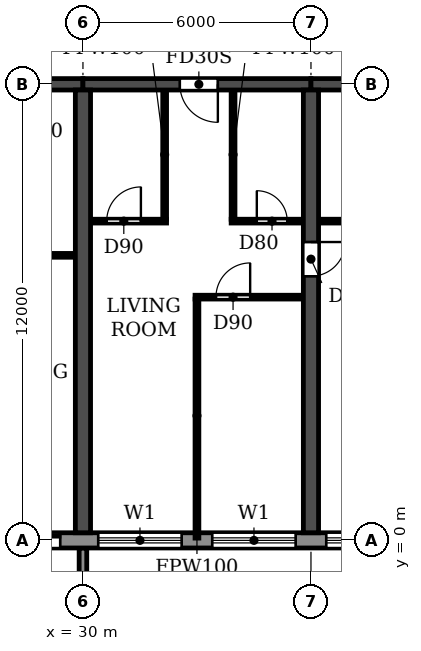
"""IFC4 building model, lengths in metres.
Left out: names, types, materials, properties, quantities, classifications, styles, units other than length and angle.
Written with IfcOpenShell. Run it as: python <this file> out.ifc"""

import sys

from ifc_helpers import new_model, si_unit, direction, frame, frame_2d, origin, place, context, subcontext, project, spatial, polyline, rectangle, outline, extrude, source, transform, mapped, element, fill, save


model = new_model("IFC4")
c1 = context("Model", 3, precision=1e-05, world=origin(), true_north=direction((0.0, 1.0)))
c2 = subcontext(c1, "Body", "Model", "MODEL_VIEW")
j1 = project(units=[si_unit("LENGTHUNIT", "METRE"), si_unit("PLANEANGLEUNIT", "RADIAN")], contexts=[c1])
p1 = place(None, origin())
s1 = spatial("IfcSite", under=j1, at=p1, CompositionType="ELEMENT")
p2 = place(p1, origin())
s2 = spatial("IfcBuilding", under=s1, at=p2, CompositionType="ELEMENT")
p3 = place(p2, frame((0.0, 0.0, 33.3)))
s3 = spatial("IfcBuildingStorey", under=s2, at=p3, CompositionType="ELEMENT", Elevation=33.3)
p4 = place(p3, frame((30.0, 0.2, 0.0), z_axis=(0.0, 0.0, 1.0), x_axis=(0.0, 1.0, 0.0)))
e1 = element("IfcWall", 1, at=p4, inside=s3, PredefinedType="SHEAR", context=c2, shape_type="SweptSolid", body=[
    extrude(rectangle(XDim=11.65, YDim=0.4, at=frame_2d((5.825, 0.0))), origin(), (0.0, 0.0, 1.0), 3.05),
])
p5 = place(p3, frame((36.0, 0.2, 0.0), z_axis=(0.0, 0.0, 1.0), x_axis=(0.0, 1.0, 0.0)))
e2 = element("IfcWall", 2, at=p5, inside=s3, PredefinedType="SHEAR", context=c2, shape_type="SweptSolid", body=[
    extrude(rectangle(XDim=11.65, YDim=0.4, at=frame_2d((5.825, 0.0))), origin(), (0.0, 0.0, 1.0), 3.05),
])
p6 = place(p5, frame((6.75, 0.0, 0.0)))
e3 = element("IfcOpeningElement", 3, at=p6, cuts=e2, PredefinedType="OPENING", context=c2, shape_type="SweptSolid", body=[
    extrude(rectangle(XDim=0.9, YDim=2.1, at=frame_2d((0.45, 1.05))), frame((0.0, 0.21, 0.0), z_axis=(0.0, -1.0, 0.0), x_axis=(1.0, 0.0, 0.0)), (0.0, 0.0, 1.0), 0.42),
])
p7 = place(p3, frame((24.0, 12.0, 0.0), z_axis=(0.0, 0.0, 1.0), x_axis=(1.0, 0.0, 0.0)))
e4 = element("IfcWall", 4, at=p7, inside=s3, PredefinedType="SHEAR", context=c2, shape_type="SweptSolid", body=[
    extrude(rectangle(XDim=6.0, YDim=0.3, at=frame_2d((3.0, 0.0))), origin(), (0.0, 0.0, 1.0), 2.45),
])
p8 = place(p7, frame((2.55, 0.0, 0.0)))
e5 = element("IfcOpeningElement", 5, at=p8, cuts=e4, PredefinedType="OPENING", context=c2, shape_type="SweptSolid", body=[
    extrude(rectangle(XDim=1.0, YDim=2.1, at=frame_2d((0.5, 1.05))), frame((0.0, 0.16, 0.0), z_axis=(0.0, -1.0, 0.0), x_axis=(1.0, 0.0, 0.0)), (0.0, 0.0, 1.0), 0.32),
])
p9 = place(p3, frame((30.0, 12.0, 0.0), z_axis=(0.0, 0.0, 1.0), x_axis=(1.0, 0.0, 0.0)))
e6 = element("IfcWall", 6, at=p9, inside=s3, PredefinedType="SHEAR", context=c2, shape_type="SweptSolid", body=[
    extrude(rectangle(XDim=6.0, YDim=0.3, at=frame_2d((3.0, 0.0))), origin(), (0.0, 0.0, 1.0), 2.45),
])
p10 = place(p9, frame((2.55, 0.0, 0.0)))
e7 = element("IfcOpeningElement", 7, at=p10, cuts=e6, PredefinedType="OPENING", context=c2, shape_type="SweptSolid", body=[
    extrude(rectangle(XDim=1.0, YDim=2.1, at=frame_2d((0.5, 1.05))), frame((0.0, 0.16, 0.0), z_axis=(0.0, -1.0, 0.0), x_axis=(1.0, 0.0, 0.0)), (0.0, 0.0, 1.0), 0.32),
])
p11 = place(p3, frame((36.0, 12.0, 0.0), z_axis=(0.0, 0.0, 1.0), x_axis=(1.0, 0.0, 0.0)))
e8 = element("IfcWall", 8, at=p11, inside=s3, PredefinedType="SHEAR", context=c2, shape_type="SweptSolid", body=[
    extrude(rectangle(XDim=6.0, YDim=0.3, at=frame_2d((3.0, 0.0))), origin(), (0.0, 0.0, 1.0), 2.45),
])
p12 = place(p3, frame((4.683, 0.0, 0.0), z_axis=(0.0, 0.0, 1.0), x_axis=(1.0, 0.0, 0.0)))
e9 = element("IfcWall", 9, at=p12, inside=s3, PredefinedType="STANDARD", context=c2, shape_type="SweptSolid", body=[
    extrude(rectangle(XDim=92.634, YDim=0.4, at=frame_2d((46.317, 0.0))), origin(), (0.0, 0.0, 1.0), 3.05),
])
p13 = place(p12, frame((1.717, 0.0, 0.9)))
e10 = element("IfcOpeningElement", 10, at=p13, cuts=e9, PredefinedType="OPENING", context=c2, shape_type="SweptSolid", body=[
    extrude(rectangle(XDim=2.2, YDim=1.5, at=frame_2d((1.1, 0.75))), frame((0.0, 0.21, 0.0), z_axis=(0.0, -1.0, 0.0), x_axis=(1.0, 0.0, 0.0)), (0.0, 0.0, 1.0), 0.42),
])
p14 = place(p12, frame((4.717, 0.0, 0.9)))
e11 = element("IfcOpeningElement", 11, at=p14, cuts=e9, PredefinedType="OPENING", context=c2, shape_type="SweptSolid", body=[
    extrude(rectangle(XDim=2.2, YDim=1.5, at=frame_2d((1.1, 0.75))), frame((0.0, 0.21, 0.0), z_axis=(0.0, -1.0, 0.0), x_axis=(1.0, 0.0, 0.0)), (0.0, 0.0, 1.0), 0.42),
])
p15 = place(p12, frame((7.917, 0.0, 0.0)))
e12 = element("IfcOpeningElement", 12, at=p15, cuts=e9, PredefinedType="OPENING", context=c2, shape_type="SweptSolid", body=[
    extrude(rectangle(XDim=1.8, YDim=2.4, at=frame_2d((0.9, 1.2))), frame((0.0, 0.21, 0.0), z_axis=(0.0, -1.0, 0.0), x_axis=(1.0, 0.0, 0.0)), (0.0, 0.0, 1.0), 0.42),
])
p16 = place(p12, frame((10.717, 0.0, 0.9)))
e13 = element("IfcOpeningElement", 13, at=p16, cuts=e9, PredefinedType="OPENING", context=c2, shape_type="SweptSolid", body=[
    extrude(rectangle(XDim=2.2, YDim=1.5, at=frame_2d((1.1, 0.75))), frame((0.0, 0.21, 0.0), z_axis=(0.0, -1.0, 0.0), x_axis=(1.0, 0.0, 0.0)), (0.0, 0.0, 1.0), 0.42),
])
p17 = place(p12, frame((13.717, 0.0, 0.9)))
e14 = element("IfcOpeningElement", 14, at=p17, cuts=e9, PredefinedType="OPENING", context=c2, shape_type="SweptSolid", body=[
    extrude(rectangle(XDim=2.2, YDim=1.5, at=frame_2d((1.1, 0.75))), frame((0.0, 0.21, 0.0), z_axis=(0.0, -1.0, 0.0), x_axis=(1.0, 0.0, 0.0)), (0.0, 0.0, 1.0), 0.42),
])
p18 = place(p12, frame((16.717, 0.0, 0.9)))
e15 = element("IfcOpeningElement", 15, at=p18, cuts=e9, PredefinedType="OPENING", context=c2, shape_type="SweptSolid", body=[
    extrude(rectangle(XDim=2.2, YDim=1.5, at=frame_2d((1.1, 0.75))), frame((0.0, 0.21, 0.0), z_axis=(0.0, -1.0, 0.0), x_axis=(1.0, 0.0, 0.0)), (0.0, 0.0, 1.0), 0.42),
])
p19 = place(p12, frame((19.717, 0.0, 0.9)))
e16 = element("IfcOpeningElement", 16, at=p19, cuts=e9, PredefinedType="OPENING", context=c2, shape_type="SweptSolid", body=[
    extrude(rectangle(XDim=2.2, YDim=1.5, at=frame_2d((1.1, 0.75))), frame((0.0, 0.21, 0.0), z_axis=(0.0, -1.0, 0.0), x_axis=(1.0, 0.0, 0.0)), (0.0, 0.0, 1.0), 0.42),
])
p20 = place(p12, frame((22.917, 0.0, 0.0)))
e17 = element("IfcOpeningElement", 17, at=p20, cuts=e9, PredefinedType="OPENING", context=c2, shape_type="SweptSolid", body=[
    extrude(rectangle(XDim=1.8, YDim=2.4, at=frame_2d((0.9, 1.2))), frame((0.0, 0.21, 0.0), z_axis=(0.0, -1.0, 0.0), x_axis=(1.0, 0.0, 0.0)), (0.0, 0.0, 1.0), 0.42),
])
p21 = place(p12, frame((25.717, 0.0, 0.9)))
e18 = element("IfcOpeningElement", 18, at=p21, cuts=e9, PredefinedType="OPENING", context=c2, shape_type="SweptSolid", body=[
    extrude(rectangle(XDim=2.2, YDim=1.5, at=frame_2d((1.1, 0.75))), frame((0.0, 0.21, 0.0), z_axis=(0.0, -1.0, 0.0), x_axis=(1.0, 0.0, 0.0)), (0.0, 0.0, 1.0), 0.42),
])
p22 = place(p12, frame((28.717, 0.0, 0.9)))
e19 = element("IfcOpeningElement", 19, at=p22, cuts=e9, PredefinedType="OPENING", context=c2, shape_type="SweptSolid", body=[
    extrude(rectangle(XDim=2.2, YDim=1.5, at=frame_2d((1.1, 0.75))), frame((0.0, 0.21, 0.0), z_axis=(0.0, -1.0, 0.0), x_axis=(1.0, 0.0, 0.0)), (0.0, 0.0, 1.0), 0.42),
])
p23 = place(p12, frame((31.717, 0.0, 0.9)))
e20 = element("IfcOpeningElement", 20, at=p23, cuts=e9, PredefinedType="OPENING", context=c2, shape_type="SweptSolid", body=[
    extrude(rectangle(XDim=2.2, YDim=1.5, at=frame_2d((1.1, 0.75))), frame((0.0, 0.21, 0.0), z_axis=(0.0, -1.0, 0.0), x_axis=(1.0, 0.0, 0.0)), (0.0, 0.0, 1.0), 0.42),
])
p24 = place(p12, frame((34.717, 0.0, 0.9)))
e21 = element("IfcOpeningElement", 21, at=p24, cuts=e9, PredefinedType="OPENING", context=c2, shape_type="SweptSolid", body=[
    extrude(rectangle(XDim=2.2, YDim=1.5, at=frame_2d((1.1, 0.75))), frame((0.0, 0.21, 0.0), z_axis=(0.0, -1.0, 0.0), x_axis=(1.0, 0.0, 0.0)), (0.0, 0.0, 1.0), 0.42),
])
p25 = place(p12, frame((37.717, 0.0, 0.9)))
e22 = element("IfcOpeningElement", 22, at=p25, cuts=e9, PredefinedType="OPENING", context=c2, shape_type="SweptSolid", body=[
    extrude(rectangle(XDim=2.2, YDim=1.5, at=frame_2d((1.1, 0.75))), frame((0.0, 0.21, 0.0), z_axis=(0.0, -1.0, 0.0), x_axis=(1.0, 0.0, 0.0)), (0.0, 0.0, 1.0), 0.42),
])
p26 = place(p12, frame((40.717, 0.0, 0.9)))
e23 = element("IfcOpeningElement", 23, at=p26, cuts=e9, PredefinedType="OPENING", context=c2, shape_type="SweptSolid", body=[
    extrude(rectangle(XDim=2.2, YDim=1.5, at=frame_2d((1.1, 0.75))), frame((0.0, 0.21, 0.0), z_axis=(0.0, -1.0, 0.0), x_axis=(1.0, 0.0, 0.0)), (0.0, 0.0, 1.0), 0.42),
])
p27 = place(p12, frame((43.717, 0.0, 0.9)))
e24 = element("IfcOpeningElement", 24, at=p27, cuts=e9, PredefinedType="OPENING", context=c2, shape_type="SweptSolid", body=[
    extrude(rectangle(XDim=2.2, YDim=1.5, at=frame_2d((1.1, 0.75))), frame((0.0, 0.21, 0.0), z_axis=(0.0, -1.0, 0.0), x_axis=(1.0, 0.0, 0.0)), (0.0, 0.0, 1.0), 0.42),
])
p28 = place(p12, frame((46.917, 0.0, 0.0)))
e25 = element("IfcOpeningElement", 25, at=p28, cuts=e9, PredefinedType="OPENING", context=c2, shape_type="SweptSolid", body=[
    extrude(rectangle(XDim=1.8, YDim=2.4, at=frame_2d((0.9, 1.2))), frame((0.0, 0.21, 0.0), z_axis=(0.0, -1.0, 0.0), x_axis=(1.0, 0.0, 0.0)), (0.0, 0.0, 1.0), 0.42),
])
p29 = place(p12, frame((49.717, 0.0, 0.9)))
e26 = element("IfcOpeningElement", 26, at=p29, cuts=e9, PredefinedType="OPENING", context=c2, shape_type="SweptSolid", body=[
    extrude(rectangle(XDim=2.2, YDim=1.5, at=frame_2d((1.1, 0.75))), frame((0.0, 0.21, 0.0), z_axis=(0.0, -1.0, 0.0), x_axis=(1.0, 0.0, 0.0)), (0.0, 0.0, 1.0), 0.42),
])
p30 = place(p12, frame((52.717, 0.0, 0.9)))
e27 = element("IfcOpeningElement", 27, at=p30, cuts=e9, PredefinedType="OPENING", context=c2, shape_type="SweptSolid", body=[
    extrude(rectangle(XDim=2.2, YDim=1.5, at=frame_2d((1.1, 0.75))), frame((0.0, 0.21, 0.0), z_axis=(0.0, -1.0, 0.0), x_axis=(1.0, 0.0, 0.0)), (0.0, 0.0, 1.0), 0.42),
])
p31 = place(p12, frame((55.717, 0.0, 0.9)))
e28 = element("IfcOpeningElement", 28, at=p31, cuts=e9, PredefinedType="OPENING", context=c2, shape_type="SweptSolid", body=[
    extrude(rectangle(XDim=2.2, YDim=1.5, at=frame_2d((1.1, 0.75))), frame((0.0, 0.21, 0.0), z_axis=(0.0, -1.0, 0.0), x_axis=(1.0, 0.0, 0.0)), (0.0, 0.0, 1.0), 0.42),
])
p32 = place(p12, frame((58.917, 0.0, 0.0)))
e29 = element("IfcOpeningElement", 29, at=p32, cuts=e9, PredefinedType="OPENING", context=c2, shape_type="SweptSolid", body=[
    extrude(rectangle(XDim=1.8, YDim=2.4, at=frame_2d((0.9, 1.2))), frame((0.0, 0.21, 0.0), z_axis=(0.0, -1.0, 0.0), x_axis=(1.0, 0.0, 0.0)), (0.0, 0.0, 1.0), 0.42),
])
p33 = place(p12, frame((61.717, 0.0, 0.9)))
e30 = element("IfcOpeningElement", 30, at=p33, cuts=e9, PredefinedType="OPENING", context=c2, shape_type="SweptSolid", body=[
    extrude(rectangle(XDim=2.2, YDim=1.5, at=frame_2d((1.1, 0.75))), frame((0.0, 0.21, 0.0), z_axis=(0.0, -1.0, 0.0), x_axis=(1.0, 0.0, 0.0)), (0.0, 0.0, 1.0), 0.42),
])
p34 = place(p12, frame((64.717, 0.0, 0.9)))
e31 = element("IfcOpeningElement", 31, at=p34, cuts=e9, PredefinedType="OPENING", context=c2, shape_type="SweptSolid", body=[
    extrude(rectangle(XDim=2.2, YDim=1.5, at=frame_2d((1.1, 0.75))), frame((0.0, 0.21, 0.0), z_axis=(0.0, -1.0, 0.0), x_axis=(1.0, 0.0, 0.0)), (0.0, 0.0, 1.0), 0.42),
])
p35 = place(p12, frame((67.717, 0.0, 0.9)))
e32 = element("IfcOpeningElement", 32, at=p35, cuts=e9, PredefinedType="OPENING", context=c2, shape_type="SweptSolid", body=[
    extrude(rectangle(XDim=2.2, YDim=1.5, at=frame_2d((1.1, 0.75))), frame((0.0, 0.21, 0.0), z_axis=(0.0, -1.0, 0.0), x_axis=(1.0, 0.0, 0.0)), (0.0, 0.0, 1.0), 0.42),
])
p36 = place(p12, frame((70.917, 0.0, 0.0)))
e33 = element("IfcOpeningElement", 33, at=p36, cuts=e9, PredefinedType="OPENING", context=c2, shape_type="SweptSolid", body=[
    extrude(rectangle(XDim=1.8, YDim=2.4, at=frame_2d((0.9, 1.2))), frame((0.0, 0.21, 0.0), z_axis=(0.0, -1.0, 0.0), x_axis=(1.0, 0.0, 0.0)), (0.0, 0.0, 1.0), 0.42),
])
p37 = place(p12, frame((73.717, 0.0, 0.9)))
e34 = element("IfcOpeningElement", 34, at=p37, cuts=e9, PredefinedType="OPENING", context=c2, shape_type="SweptSolid", body=[
    extrude(rectangle(XDim=2.2, YDim=1.5, at=frame_2d((1.1, 0.75))), frame((0.0, 0.21, 0.0), z_axis=(0.0, -1.0, 0.0), x_axis=(1.0, 0.0, 0.0)), (0.0, 0.0, 1.0), 0.42),
])
p38 = place(p12, frame((76.717, 0.0, 0.9)))
e35 = element("IfcOpeningElement", 35, at=p38, cuts=e9, PredefinedType="OPENING", context=c2, shape_type="SweptSolid", body=[
    extrude(rectangle(XDim=2.2, YDim=1.5, at=frame_2d((1.1, 0.75))), frame((0.0, 0.21, 0.0), z_axis=(0.0, -1.0, 0.0), x_axis=(1.0, 0.0, 0.0)), (0.0, 0.0, 1.0), 0.42),
])
p39 = place(p12, frame((79.717, 0.0, 0.9)))
e36 = element("IfcOpeningElement", 36, at=p39, cuts=e9, PredefinedType="OPENING", context=c2, shape_type="SweptSolid", body=[
    extrude(rectangle(XDim=2.2, YDim=1.5, at=frame_2d((1.1, 0.75))), frame((0.0, 0.21, 0.0), z_axis=(0.0, -1.0, 0.0), x_axis=(1.0, 0.0, 0.0)), (0.0, 0.0, 1.0), 0.42),
])
p40 = place(p12, frame((82.717, 0.0, 0.9)))
e37 = element("IfcOpeningElement", 37, at=p40, cuts=e9, PredefinedType="OPENING", context=c2, shape_type="SweptSolid", body=[
    extrude(rectangle(XDim=2.2, YDim=1.5, at=frame_2d((1.1, 0.75))), frame((0.0, 0.21, 0.0), z_axis=(0.0, -1.0, 0.0), x_axis=(1.0, 0.0, 0.0)), (0.0, 0.0, 1.0), 0.42),
])
p41 = place(p12, frame((85.717, 0.0, 0.9)))
e38 = element("IfcOpeningElement", 38, at=p41, cuts=e9, PredefinedType="OPENING", context=c2, shape_type="SweptSolid", body=[
    extrude(rectangle(XDim=2.2, YDim=1.5, at=frame_2d((1.1, 0.75))), frame((0.0, 0.21, 0.0), z_axis=(0.0, -1.0, 0.0), x_axis=(1.0, 0.0, 0.0)), (0.0, 0.0, 1.0), 0.42),
])
p42 = place(p12, frame((88.717, 0.0, 0.9)))
e39 = element("IfcOpeningElement", 39, at=p42, cuts=e9, PredefinedType="OPENING", context=c2, shape_type="SweptSolid", body=[
    extrude(rectangle(XDim=2.2, YDim=1.5, at=frame_2d((1.1, 0.75))), frame((0.0, 0.21, 0.0), z_axis=(0.0, -1.0, 0.0), x_axis=(1.0, 0.0, 0.0)), (0.0, 0.0, 1.0), 0.42),
])
m1 = source(origin(), c2, "Body", "SweptSolid", [
    extrude(outline(polyline([(0.0, 0.0), (0.2, 0.0), (0.2, 1.65), (0.0, 1.65), (0.0, 0.0)])), origin(), (0.0, 0.0, 1.0), 3.1),
])
p43 = place(p3, frame((29.9, -1.85, 0.0)))
e40 = element("IfcWall", 40, at=p43, inside=s3, PredefinedType="STANDARD", context=c2, shape_type="MappedRepresentation", body=[
    mapped(m1, transform((0.0, 0.0, 0.0))),
])
p44 = place(p3, frame((32.95, 6.4, 0.0), z_axis=(0.0, 0.0, 1.0), x_axis=(1.0, 0.0, 0.0)))
e41 = element("IfcWall", 41, at=p44, inside=s3, PredefinedType="PARTITIONING", context=c2, shape_type="SweptSolid", body=[
    extrude(rectangle(XDim=2.84, YDim=0.1, at=frame_2d((1.42, 0.0))), origin(), (0.0, 0.0, 1.0), 3.05),
])
p45 = place(p44, frame((0.55, 0.0, 0.0)))
e42 = element("IfcOpeningElement", 42, at=p45, cuts=e41, PredefinedType="OPENING", context=c2, shape_type="SweptSolid", body=[
    extrude(rectangle(XDim=0.9, YDim=2.1, at=frame_2d((0.45, 1.05))), frame((0.0, 0.06, 0.0), z_axis=(0.0, -1.0, 0.0), x_axis=(1.0, 0.0, 0.0)), (0.0, 0.0, 1.0), 0.12),
])
p46 = place(p3, frame((27.9, 7.5, 0.0), z_axis=(0.0, 0.0, 1.0), x_axis=(1.0, 0.0, 0.0)))
e43 = element("IfcWall", 43, at=p46, inside=s3, PredefinedType="PARTITIONING", context=c2, shape_type="SweptSolid", body=[
    extrude(rectangle(XDim=1.89, YDim=0.1, at=frame_2d((0.945, 0.0))), origin(), (0.0, 0.0, 1.0), 3.05),
])
p47 = place(p3, frame((30.21, 8.4, 0.0), z_axis=(0.0, 0.0, 1.0), x_axis=(1.0, 0.0, 0.0)))
e44 = element("IfcWall", 44, at=p47, inside=s3, PredefinedType="PARTITIONING", context=c2, shape_type="SweptSolid", body=[
    extrude(rectangle(XDim=1.99, YDim=0.1, at=frame_2d((0.995, 0.0))), origin(), (0.0, 0.0, 1.0), 3.05),
])
p48 = place(p47, frame((0.415, 0.0, 0.0)))
e45 = element("IfcOpeningElement", 45, at=p48, cuts=e44, PredefinedType="OPENING", context=c2, shape_type="SweptSolid", body=[
    extrude(rectangle(XDim=0.9, YDim=2.1, at=frame_2d((0.45, 1.05))), frame((0.0, 0.06, 0.0), z_axis=(0.0, -1.0, 0.0), x_axis=(1.0, 0.0, 0.0)), (0.0, 0.0, 1.0), 0.12),
])
p49 = place(p3, frame((33.9, 8.4, 0.0), z_axis=(0.0, 0.0, 1.0), x_axis=(1.0, 0.0, 0.0)))
e46 = element("IfcWall", 46, at=p49, inside=s3, PredefinedType="PARTITIONING", context=c2, shape_type="SweptSolid", body=[
    extrude(rectangle(XDim=1.89, YDim=0.1, at=frame_2d((0.945, 0.0))), origin(), (0.0, 0.0, 1.0), 3.05),
])
p50 = place(p49, frame((0.675, 0.0, 0.0)))
e47 = element("IfcOpeningElement", 47, at=p50, cuts=e46, PredefinedType="OPENING", context=c2, shape_type="SweptSolid", body=[
    extrude(rectangle(XDim=0.8, YDim=2.1, at=frame_2d((0.4, 1.05))), frame((0.0, 0.06, 0.0), z_axis=(0.0, -1.0, 0.0), x_axis=(1.0, 0.0, 0.0)), (0.0, 0.0, 1.0), 0.12),
])
p51 = place(p3, frame((36.21, 8.4, 0.0), z_axis=(0.0, 0.0, 1.0), x_axis=(1.0, 0.0, 0.0)))
e48 = element("IfcWall", 48, at=p51, inside=s3, PredefinedType="PARTITIONING", context=c2, shape_type="SweptSolid", body=[
    extrude(rectangle(XDim=2.69, YDim=0.1, at=frame_2d((1.345, 0.0))), origin(), (0.0, 0.0, 1.0), 3.05),
])
p52 = place(p51, frame((0.89, 0.0, 0.0)))
e49 = element("IfcOpeningElement", 49, at=p52, cuts=e48, PredefinedType="OPENING", context=c2, shape_type="SweptSolid", body=[
    extrude(rectangle(XDim=0.8, YDim=2.1, at=frame_2d((0.4, 1.05))), frame((0.0, 0.06, 0.0), z_axis=(0.0, -1.0, 0.0), x_axis=(1.0, 0.0, 0.0)), (0.0, 0.0, 1.0), 0.12),
])
p53 = place(p3, frame((32.15, 8.45, 0.0), z_axis=(0.0, 0.0, 1.0), x_axis=(0.0, 1.0, 0.0)))
e50 = element("IfcWall", 50, at=p53, inside=s3, PredefinedType="PARTITIONING", context=c2, shape_type="SweptSolid", body=[
    extrude(rectangle(XDim=3.39, YDim=0.1, at=frame_2d((1.695, 0.0))), origin(), (0.0, 0.0, 1.0), 3.05),
])
p54 = place(p3, frame((33.0, 0.06, 0.0), z_axis=(0.0, 0.0, 1.0), x_axis=(0.0, 1.0, 0.0)))
e51 = element("IfcWall", 51, at=p54, inside=s3, PredefinedType="PARTITIONING", context=c2, shape_type="SweptSolid", body=[
    extrude(rectangle(XDim=6.29, YDim=0.1, at=frame_2d((3.145, 0.0))), origin(), (0.0, 0.0, 1.0), 3.05),
])
p55 = place(p3, frame((33.95, 8.45, 0.0), z_axis=(0.0, 0.0, 1.0), x_axis=(0.0, 1.0, 0.0)))
e52 = element("IfcWall", 52, at=p55, inside=s3, PredefinedType="PARTITIONING", context=c2, shape_type="SweptSolid", body=[
    extrude(rectangle(XDim=3.39, YDim=0.1, at=frame_2d((1.695, 0.0))), origin(), (0.0, 0.0, 1.0), 3.05),
])
p56 = place(p20, origin())
e53 = element("IfcDoor", 53, at=p56, inside=s3, OperationType="DOUBLE_DOOR_SLIDING", PredefinedType="DOOR", context=c2, shape_type="SweptSolid", body=[
    extrude(rectangle(XDim=1.8, YDim=2.4, at=frame_2d((0.9, 1.2))), frame((0.0, 0.025, 0.0), z_axis=(0.0, -1.0, 0.0), x_axis=(1.0, 0.0, 0.0)), (0.0, 0.0, 1.0), 0.05),
])
fill(e17, e53)
p57 = place(p21, origin())
e54 = element("IfcWindow", 54, at=p57, inside=s3, PartitioningType="DOUBLE_PANEL_HORIZONTAL", PredefinedType="WINDOW", context=c2, shape_type="SweptSolid", body=[
    extrude(rectangle(XDim=2.2, YDim=1.5, at=frame_2d((1.1, 0.75))), frame((0.0, 0.03, 0.0), z_axis=(0.0, -1.0, 0.0), x_axis=(1.0, 0.0, 0.0)), (0.0, 0.0, 1.0), 0.06),
])
fill(e18, e54)
p58 = place(p22, origin())
e55 = element("IfcWindow", 55, at=p58, inside=s3, PartitioningType="DOUBLE_PANEL_HORIZONTAL", PredefinedType="WINDOW", context=c2, shape_type="SweptSolid", body=[
    extrude(rectangle(XDim=2.2, YDim=1.5, at=frame_2d((1.1, 0.75))), frame((0.0, 0.03, 0.0), z_axis=(0.0, -1.0, 0.0), x_axis=(1.0, 0.0, 0.0)), (0.0, 0.0, 1.0), 0.06),
])
fill(e19, e55)
p59 = place(p23, origin())
e56 = element("IfcWindow", 56, at=p59, inside=s3, PartitioningType="DOUBLE_PANEL_HORIZONTAL", PredefinedType="WINDOW", context=c2, shape_type="SweptSolid", body=[
    extrude(rectangle(XDim=2.2, YDim=1.5, at=frame_2d((1.1, 0.75))), frame((0.0, 0.03, 0.0), z_axis=(0.0, -1.0, 0.0), x_axis=(1.0, 0.0, 0.0)), (0.0, 0.0, 1.0), 0.06),
])
fill(e20, e56)
p60 = place(p48, origin())
e57 = element("IfcDoor", 57, at=p60, inside=s3, OperationType="SINGLE_SWING_RIGHT", PredefinedType="DOOR", context=c2, shape_type="SweptSolid", body=[
    extrude(rectangle(XDim=0.9, YDim=2.1, at=frame_2d((0.45, 1.05))), frame((0.0, 0.025, 0.0), z_axis=(0.0, -1.0, 0.0), x_axis=(1.0, 0.0, 0.0)), (0.0, 0.0, 1.0), 0.05),
])
fill(e45, e57)
p61 = place(p10, frame((1.0, 0.0, 0.0), z_axis=(0.0, 0.0, 1.0), x_axis=(-1.0, 0.0, 0.0)))
e58 = element("IfcDoor", 58, at=p61, inside=s3, OperationType="SINGLE_SWING_LEFT", PredefinedType="DOOR", context=c2, shape_type="SweptSolid", body=[
    extrude(rectangle(XDim=1.0, YDim=2.1, at=frame_2d((0.5, 1.05))), frame((0.0, 0.025, 0.0), z_axis=(0.0, -1.0, 0.0), x_axis=(1.0, 0.0, 0.0)), (0.0, 0.0, 1.0), 0.05),
])
fill(e7, e58)
p62 = place(p45, origin())
e59 = element("IfcDoor", 59, at=p62, inside=s3, OperationType="SINGLE_SWING_RIGHT", PredefinedType="DOOR", context=c2, shape_type="SweptSolid", body=[
    extrude(rectangle(XDim=0.9, YDim=2.1, at=frame_2d((0.45, 1.05))), frame((0.0, 0.025, 0.0), z_axis=(0.0, -1.0, 0.0), x_axis=(1.0, 0.0, 0.0)), (0.0, 0.0, 1.0), 0.05),
])
fill(e42, e59)
p63 = place(p50, origin())
e60 = element("IfcDoor", 60, at=p63, inside=s3, OperationType="SINGLE_SWING_LEFT", PredefinedType="DOOR", context=c2, shape_type="SweptSolid", body=[
    extrude(rectangle(XDim=0.8, YDim=2.1, at=frame_2d((0.4, 1.05))), frame((0.0, 0.025, 0.0), z_axis=(0.0, -1.0, 0.0), x_axis=(1.0, 0.0, 0.0)), (0.0, 0.0, 1.0), 0.05),
])
fill(e47, e60)
p64 = place(p6, frame((0.9, 0.0, 0.0), z_axis=(0.0, 0.0, 1.0), x_axis=(-1.0, 0.0, 0.0)))
e61 = element("IfcDoor", 61, at=p64, inside=s3, OperationType="SINGLE_SWING_LEFT", PredefinedType="DOOR", context=c2, shape_type="SweptSolid", body=[
    extrude(rectangle(XDim=0.9, YDim=2.1, at=frame_2d((0.45, 1.05))), frame((0.0, 0.025, 0.0), z_axis=(0.0, -1.0, 0.0), x_axis=(1.0, 0.0, 0.0)), (0.0, 0.0, 1.0), 0.05),
])
fill(e3, e61)
save(model, sys.argv[1])
